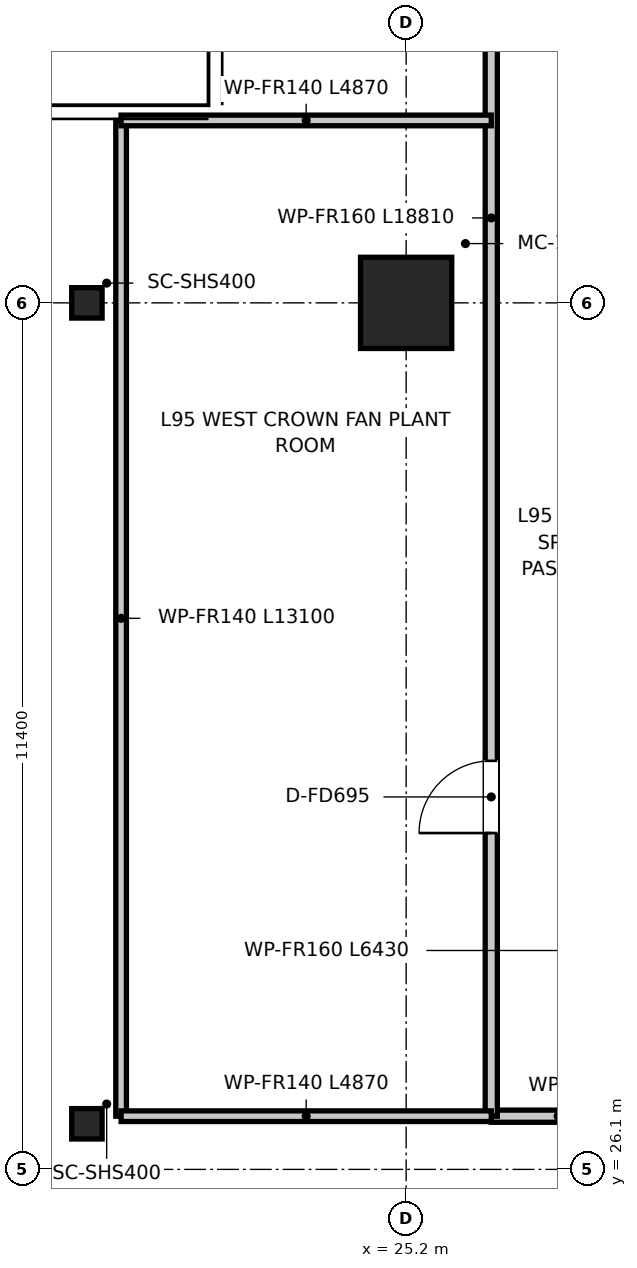
"""IFC4 building model, lengths in metres.
Left out: names, types, materials, properties, quantities, classifications, styles, units other than length and angle.
Written with IfcOpenShell. Run it as: python <this file> out.ifc"""

import sys

from ifc_helpers import new_model, si_unit, direction, frame, frame_2d, origin, origin_2d, place, context, subcontext, project, spatial, rectangle, hollow_rectangle, extrude, source, transform, mapped, element, fill, save


model = new_model("IFC4")
c1 = context("Model", 3, precision=1e-05, world=origin(), true_north=direction((0.0, 1.0)))
c2 = subcontext(c1, "Body", "Model", "MODEL_VIEW")
j1 = project(units=[si_unit("LENGTHUNIT", "METRE"), si_unit("PLANEANGLEUNIT", "RADIAN")], contexts=[c1])
p1 = place(None, origin())
s1 = spatial("IfcSite", under=j1, at=p1, CompositionType="ELEMENT")
p2 = place(p1, origin())
s2 = spatial("IfcBuilding", under=s1, at=p2, CompositionType="ELEMENT")
p3 = place(p2, frame((0.0, 0.0, 385.45)))
s3 = spatial("IfcBuildingStorey", under=s2, at=p3, CompositionType="ELEMENT", Elevation=385.45)
m1 = source(origin(), c2, "Body", "SweptSolid", [
    extrude(rectangle(XDim=1.2, YDim=1.2, at=origin_2d()), origin(), (0.0, 0.0, 1.0), 3.55),
])
p4 = place(p3, frame((25.2, 37.5, 0.0), z_axis=(0.0, 0.0, 1.0), x_axis=(1.0, 0.0, 0.0)))
e1 = element("IfcColumn", 1, at=p4, inside=s3, PredefinedType="USERDEFINED", context=c2, shape_type="MappedRepresentation", body=[
    mapped(m1, transform((0.0, 0.0, 0.0), x_axis=(1.0, 0.0, 0.0), y_axis=(0.0, 1.0, 0.0), z_axis=(0.0, 0.0, 1.0), scale=1.0)),
])
m2 = source(origin(), c2, "Body", "SweptSolid", [
    extrude(hollow_rectangle(XDim=0.4, YDim=0.4, WallThickness=0.025, at=origin_2d()), origin(), (0.0, 0.0, 1.0), 3.55),
])
for number, where, z_axis, x_axis in (
    (2, (21.0, 26.7, 0.0), (0.0, 0.0, 1.0), (1.0, 0.0, 0.0)),
    (3, (21.0, 37.5, 0.0), (0.0, 0.0, 1.0), (1.0, 0.0, 0.0)),
):
    element("IfcColumn", number, at=place(p3, frame(where, z_axis=z_axis, x_axis=x_axis)), inside=s3, PredefinedType="COLUMN", context=c2, shape_type="MappedRepresentation", body=[
        mapped(m2, transform((0.0, 0.0, 0.0), x_axis=(1.0, 0.0, 0.0), y_axis=(0.0, 1.0, 0.0), z_axis=(0.0, 0.0, 1.0), scale=1.0)),
    ])
p5 = place(p3, frame((26.32, 26.8, 0.0), z_axis=(0.0, 0.0, 1.0), x_axis=(1.0, 0.0, 0.0)))
e4 = element("IfcWall", 4, at=p5, inside=s3, PredefinedType="PARTITIONING", context=c2, shape_type="SweptSolid", body=[
    extrude(rectangle(XDim=1.76, YDim=0.16, at=frame_2d((0.88, 0.0))), origin(), (0.0, 0.0, 1.0), 3.25),
])
p6 = place(p3, frame((26.32, 26.8, 0.0), z_axis=(0.0, 0.0, 1.0), x_axis=(0.0, 1.0, 0.0)))
e5 = element("IfcWall", 5, at=p6, inside=s3, PredefinedType="PARTITIONING", context=c2, shape_type="SweptSolid", body=[
    extrude(rectangle(XDim=18.81, YDim=0.16, at=frame_2d((9.405, 0.0))), origin(), (0.0, 0.0, 1.0), 2.76),
])
p7 = place(p6, frame((3.725, 0.0, 0.0)))
e6 = element("IfcOpeningElement", 6, at=p7, cuts=e5, PredefinedType="OPENING", context=c2, shape_type="SweptSolid", body=[
    extrude(rectangle(XDim=0.95, YDim=2.1, at=frame_2d((0.475, 1.05))), frame((0.0, 0.09, 0.0), z_axis=(0.0, -1.0, 0.0), x_axis=(1.0, 0.0, 0.0)), (0.0, 0.0, 1.0), 0.18),
])
p8 = place(p3, frame((21.45, 26.8, 0.0), z_axis=(0.0, 0.0, 1.0), x_axis=(0.0, 1.0, 0.0)))
e7 = element("IfcWall", 7, at=p8, inside=s3, PredefinedType="PARTITIONING", context=c2, shape_type="SweptSolid", body=[
    extrude(rectangle(XDim=13.1, YDim=0.14, at=frame_2d((6.55, 0.0))), origin(), (0.0, 0.0, 1.0), 2.76),
])
p9 = place(p3, frame((21.45, 26.8, 0.0), z_axis=(0.0, 0.0, 1.0), x_axis=(1.0, 0.0, 0.0)))
e8 = element("IfcWall", 8, at=p9, inside=s3, PredefinedType="PARTITIONING", context=c2, shape_type="SweptSolid", body=[
    extrude(rectangle(XDim=4.87, YDim=0.14, at=frame_2d((2.435, 0.0))), origin(), (0.0, 0.0, 1.0), 2.76),
])
p10 = place(p3, frame((21.45, 39.9, 0.0), z_axis=(0.0, 0.0, 1.0), x_axis=(1.0, 0.0, 0.0)))
e9 = element("IfcWall", 9, at=p10, inside=s3, PredefinedType="PARTITIONING", context=c2, shape_type="SweptSolid", body=[
    extrude(rectangle(XDim=4.87, YDim=0.14, at=frame_2d((2.435, 0.0))), origin(), (0.0, 0.0, 1.0), 3.25),
])
p11 = place(p7, origin())
e10 = element("IfcDoor", 10, at=p11, inside=s3, OperationType="SINGLE_SWING_LEFT", PredefinedType="DOOR", context=c2, shape_type="SweptSolid", body=[
    extrude(rectangle(XDim=0.95, YDim=2.1, at=frame_2d((0.475, 1.05))), frame((0.0, 0.025, 0.0), z_axis=(0.0, -1.0, 0.0), x_axis=(1.0, 0.0, 0.0)), (0.0, 0.0, 1.0), 0.05),
])
fill(e6, e10)
save(model, sys.argv[1])
